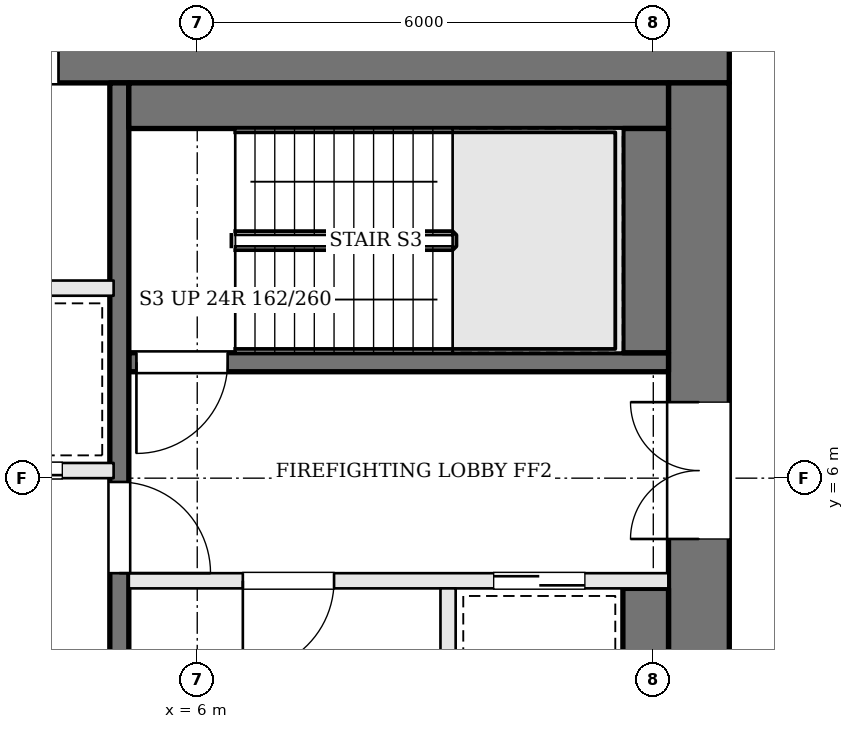
"""IFC4 building model, lengths in metres.
Left out: names, types, materials, properties, quantities, classifications, styles, units other than length and angle.
Written with IfcOpenShell. Run it as: python <this file> out.ifc"""

import sys

from ifc_helpers import new_model, si_unit, direction, frame, frame_2d, origin, place, context, subcontext, project, spatial, rectangle, extrude, element, fill, save


model = new_model("IFC4")
c1 = context("Model", 3, precision=1e-05, world=origin(), true_north=direction((0.0, 1.0)))
c2 = subcontext(c1, "Body", "Model", "MODEL_VIEW")
j1 = project(units=[si_unit("LENGTHUNIT", "METRE"), si_unit("PLANEANGLEUNIT", "RADIAN")], contexts=[c1])
p1 = place(None, origin())
s1 = spatial("IfcSite", under=j1, at=p1, CompositionType="ELEMENT")
p2 = place(p1, origin())
s2 = spatial("IfcBuilding", under=s1, at=p2, CompositionType="ELEMENT")
p3 = place(p2, frame((0.0, 0.0, 268.8)))
s3 = spatial("IfcBuildingStorey", under=s2, at=p3, CompositionType="ELEMENT", Elevation=268.8)
p4 = place(p3, frame((-13.0, 11.6, 0.0), z_axis=(0.0, 0.0, 1.0), x_axis=(1.0, 0.0, 0.0)))
e1 = element("IfcWall", 1, at=p4, inside=s3, PredefinedType="SHEAR", context=c2, shape_type="SweptSolid", body=[
    extrude(rectangle(XDim=26.0, YDim=0.8, at=frame_2d((13.0, 0.0))), origin(), (0.0, 0.0, 1.0), 3.9),
])
p5 = place(p4, frame((8.825, 0.0, 0.0)))
e2 = element("IfcOpeningElement", 2, at=p5, cuts=e1, PredefinedType="OPENING", context=c2, shape_type="SweptSolid", body=[
    extrude(rectangle(XDim=1.0, YDim=2.1, at=frame_2d((0.5, 1.05))), frame((0.0, 0.41, 0.0), z_axis=(0.0, -1.0, 0.0), x_axis=(1.0, 0.0, 0.0)), (0.0, 0.0, 1.0), 0.82),
])
p6 = place(p4, frame((11.825, 0.0, 0.0)))
e3 = element("IfcOpeningElement", 3, at=p6, cuts=e1, PredefinedType="OPENING", context=c2, shape_type="SweptSolid", body=[
    extrude(rectangle(XDim=0.7, YDim=2.1, at=frame_2d((0.35, 1.05))), frame((0.0, 0.41, 0.0), z_axis=(0.0, -1.0, 0.0), x_axis=(1.0, 0.0, 0.0)), (0.0, 0.0, 1.0), 0.82),
])
p7 = place(p4, frame((14.275, 0.0, 0.0)))
e4 = element("IfcOpeningElement", 4, at=p7, cuts=e1, PredefinedType="OPENING", context=c2, shape_type="SweptSolid", body=[
    extrude(rectangle(XDim=0.7, YDim=2.1, at=frame_2d((0.35, 1.05))), frame((0.0, 0.41, 0.0), z_axis=(0.0, -1.0, 0.0), x_axis=(1.0, 0.0, 0.0)), (0.0, 0.0, 1.0), 0.82),
])
p8 = place(p4, frame((16.175, 0.0, 0.0)))
e5 = element("IfcOpeningElement", 5, at=p8, cuts=e1, PredefinedType="OPENING", context=c2, shape_type="SweptSolid", body=[
    extrude(rectangle(XDim=1.0, YDim=2.1, at=frame_2d((0.5, 1.05))), frame((0.0, 0.41, 0.0), z_axis=(0.0, -1.0, 0.0), x_axis=(1.0, 0.0, 0.0)), (0.0, 0.0, 1.0), 0.82),
])
p9 = place(p3, frame((12.6, -2.2, 0.0), z_axis=(0.0, 0.0, 1.0), x_axis=(0.0, 1.0, 0.0)))
e6 = element("IfcWall", 6, at=p9, inside=s3, PredefinedType="SHEAR", context=c2, shape_type="SweptSolid", body=[
    extrude(rectangle(XDim=13.4, YDim=0.8, at=frame_2d((6.7, 0.0))), origin(), (0.0, 0.0, 1.0), 3.9),
])
p10 = place(p9, frame((7.4, 0.0, 0.0)))
e7 = element("IfcOpeningElement", 7, at=p10, cuts=e6, PredefinedType="OPENING", context=c2, shape_type="SweptSolid", body=[
    extrude(rectangle(XDim=1.8, YDim=2.1, at=frame_2d((0.9, 1.05))), frame((0.0, 0.41, 0.0), z_axis=(0.0, -1.0, 0.0), x_axis=(1.0, 0.0, 0.0)), (0.0, 0.0, 1.0), 0.82),
])
p11 = place(p3, frame((12.2, 7.525, 0.0), z_axis=(0.0, 0.0, 1.0), x_axis=(-1.0, 0.0, 0.0)))
e8 = element("IfcWall", 8, at=p11, inside=s3, PredefinedType="SOLIDWALL", context=c2, shape_type="SweptSolid", body=[
    extrude(rectangle(XDim=7.1, YDim=0.25, at=frame_2d((3.55, 0.0))), origin(), (0.0, 0.0, 1.0), 3.7),
])
p12 = place(p11, frame((5.8, 0.0, 0.0)))
e9 = element("IfcOpeningElement", 9, at=p12, cuts=e8, PredefinedType="OPENING", context=c2, shape_type="SweptSolid", body=[
    extrude(rectangle(XDim=1.2, YDim=2.1, at=frame_2d((0.6, 1.05))), frame((0.0, 0.135, 0.0), z_axis=(0.0, -1.0, 0.0), x_axis=(1.0, 0.0, 0.0)), (0.0, 0.0, 1.0), 0.27),
])
p13 = place(p3, frame((12.2, 4.65, 0.0), z_axis=(0.0, 0.0, 1.0), x_axis=(-1.0, 0.0, 0.0)))
e10 = element("IfcWall", 10, at=p13, inside=s3, PredefinedType="SOLIDWALL", context=c2, shape_type="SweptSolid", body=[
    extrude(rectangle(XDim=7.1, YDim=0.2, at=frame_2d((3.55, 0.0))), origin(), (0.0, 0.0, 1.0), 3.7),
])
p14 = place(p13, frame((4.4, 0.0, 0.0)))
e11 = element("IfcOpeningElement", 11, at=p14, cuts=e10, PredefinedType="OPENING", context=c2, shape_type="SweptSolid", body=[
    extrude(rectangle(XDim=1.2, YDim=2.1, at=frame_2d((0.6, 1.05))), frame((0.0, 0.11, 0.0), z_axis=(0.0, -1.0, 0.0), x_axis=(1.0, 0.0, 0.0)), (0.0, 0.0, 1.0), 0.22),
])
p15 = place(p13, frame((1.1, 0.0, 0.0)))
e12 = element("IfcOpeningElement", 12, at=p15, cuts=e10, PredefinedType="OPENING", context=c2, shape_type="SweptSolid", body=[
    extrude(rectangle(XDim=1.2, YDim=2.1, at=frame_2d((0.6, 1.05))), frame((0.0, 0.11, 0.0), z_axis=(0.0, -1.0, 0.0), x_axis=(1.0, 0.0, 0.0)), (0.0, 0.0, 1.0), 0.22),
])
p16 = place(p3, frame((9.3, 4.55, 0.0), z_axis=(0.0, 0.0, 1.0), x_axis=(0.0, -1.0, 0.0)))
e13 = element("IfcWall", 13, at=p16, inside=s3, PredefinedType="SOLIDWALL", context=c2, shape_type="SweptSolid", body=[
    extrude(rectangle(XDim=3.0, YDim=0.2, at=frame_2d((1.5, 0.0))), origin(), (0.0, 0.0, 1.0), 3.7),
])
p17 = place(p3, frame((4.975, 11.2, 0.0), z_axis=(0.0, 0.0, 1.0), x_axis=(0.0, -1.0, 0.0)))
e14 = element("IfcWall", 14, at=p17, inside=s3, PredefinedType="SOLIDWALL", context=c2, shape_type="SweptSolid", body=[
    extrude(rectangle(XDim=13.4, YDim=0.25, at=frame_2d((6.7, 0.0))), origin(), (0.0, 0.0, 1.0), 3.7),
])
p18 = place(p17, frame((5.25, 0.0, 0.0)))
e15 = element("IfcOpeningElement", 15, at=p18, cuts=e14, PredefinedType="OPENING", context=c2, shape_type="SweptSolid", body=[
    extrude(rectangle(XDim=1.2, YDim=2.1, at=frame_2d((0.6, 1.05))), frame((0.0, 0.135, 0.0), z_axis=(0.0, -1.0, 0.0), x_axis=(1.0, 0.0, 0.0)), (0.0, 0.0, 1.0), 0.27),
])
p19 = place(p3, frame((12.2, 10.9, 0.0), z_axis=(0.0, 0.0, 1.0), x_axis=(-1.0, 0.0, 0.0)))
e16 = element("IfcWall", 16, at=p19, inside=s3, PredefinedType="SOLIDWALL", context=c2, shape_type="SweptSolid", body=[
    extrude(rectangle(XDim=7.1, YDim=0.6, at=frame_2d((3.55, 0.0))), origin(), (0.0, 0.0, 1.0), 3.7),
])
p20 = place(p3, frame((11.9, 10.6, 0.0), z_axis=(0.0, 0.0, 1.0), x_axis=(0.0, -1.0, 0.0)))
e17 = element("IfcWall", 17, at=p20, inside=s3, PredefinedType="SOLIDWALL", context=c2, shape_type="SweptSolid", body=[
    extrude(rectangle(XDim=2.95, YDim=0.6, at=frame_2d((1.475, 0.0))), origin(), (0.0, 0.0, 1.0), 3.7),
])
p21 = place(p3, frame((11.9, 4.55, 0.0), z_axis=(0.0, 0.0, 1.0), x_axis=(0.0, -1.0, 0.0)))
e18 = element("IfcWall", 18, at=p21, inside=s3, PredefinedType="SOLIDWALL", context=c2, shape_type="SweptSolid", body=[
    extrude(rectangle(XDim=3.0, YDim=0.6, at=frame_2d((1.5, 0.0))), origin(), (0.0, 0.0, 1.0), 3.7),
])
p22 = place(p3, frame((-4.9, 6.1, 0.0), z_axis=(0.0, 0.0, 1.0), x_axis=(1.0, 0.0, 0.0)))
e19 = element("IfcWall", 19, at=p22, inside=s3, PredefinedType="SOLIDWALL", context=c2, shape_type="SweptSolid", body=[
    extrude(rectangle(XDim=9.8, YDim=0.2, at=frame_2d((4.9, 0.0))), origin(), (0.0, 0.0, 1.0), 3.7),
])
p23 = place(p22, frame((0.675, 0.0, 0.0)))
e20 = element("IfcOpeningElement", 20, at=p23, cuts=e19, PredefinedType="OPENING", context=c2, shape_type="SweptSolid", body=[
    extrude(rectangle(XDim=1.1, YDim=2.1, at=frame_2d((0.55, 1.05))), frame((0.0, 0.11, 0.0), z_axis=(0.0, -1.0, 0.0), x_axis=(1.0, 0.0, 0.0)), (0.0, 0.0, 1.0), 0.22),
])
p24 = place(p22, frame((3.125, 0.0, 0.0)))
e21 = element("IfcOpeningElement", 21, at=p24, cuts=e19, PredefinedType="OPENING", context=c2, shape_type="SweptSolid", body=[
    extrude(rectangle(XDim=1.1, YDim=2.1, at=frame_2d((0.55, 1.05))), frame((0.0, 0.11, 0.0), z_axis=(0.0, -1.0, 0.0), x_axis=(1.0, 0.0, 0.0)), (0.0, 0.0, 1.0), 0.22),
])
p25 = place(p22, frame((5.575, 0.0, 0.0)))
e22 = element("IfcOpeningElement", 22, at=p25, cuts=e19, PredefinedType="OPENING", context=c2, shape_type="SweptSolid", body=[
    extrude(rectangle(XDim=1.1, YDim=2.1, at=frame_2d((0.55, 1.05))), frame((0.0, 0.11, 0.0), z_axis=(0.0, -1.0, 0.0), x_axis=(1.0, 0.0, 0.0)), (0.0, 0.0, 1.0), 0.22),
])
p26 = place(p22, frame((8.025, 0.0, 0.0)))
e23 = element("IfcOpeningElement", 23, at=p26, cuts=e19, PredefinedType="OPENING", context=c2, shape_type="SweptSolid", body=[
    extrude(rectangle(XDim=1.1, YDim=2.1, at=frame_2d((0.55, 1.05))), frame((0.0, 0.11, 0.0), z_axis=(0.0, -1.0, 0.0), x_axis=(1.0, 0.0, 0.0)), (0.0, 0.0, 1.0), 0.22),
])
p27 = place(p3, frame((-4.9, 8.5, 0.0), z_axis=(0.0, 0.0, 1.0), x_axis=(1.0, 0.0, 0.0)))
e24 = element("IfcWall", 24, at=p27, inside=s3, PredefinedType="SOLIDWALL", context=c2, shape_type="SweptSolid", body=[
    extrude(rectangle(XDim=9.8, YDim=0.2, at=frame_2d((4.9, 0.0))), origin(), (0.0, 0.0, 1.0), 3.7),
])
p28 = place(p10, origin())
e25 = element("IfcDoor", 25, at=p28, inside=s3, OperationType="DOUBLE_DOOR_SINGLE_SWING", PredefinedType="DOOR", context=c2, shape_type="SweptSolid", body=[
    extrude(rectangle(XDim=1.8, YDim=2.1, at=frame_2d((0.9, 1.05))), frame((0.0, 0.025, 0.0), z_axis=(0.0, -1.0, 0.0), x_axis=(1.0, 0.0, 0.0)), (0.0, 0.0, 1.0), 0.05),
])
fill(e7, e25)
p29 = place(p18, origin())
e26 = element("IfcDoor", 26, at=p29, inside=s3, OperationType="SINGLE_SWING_RIGHT", PredefinedType="DOOR", context=c2, shape_type="SweptSolid", body=[
    extrude(rectangle(XDim=1.2, YDim=2.1, at=frame_2d((0.6, 1.05))), frame((0.0, 0.025, 0.0), z_axis=(0.0, -1.0, 0.0), x_axis=(1.0, 0.0, 0.0)), (0.0, 0.0, 1.0), 0.05),
])
fill(e15, e26)
p30 = place(p14, origin())
e27 = element("IfcDoor", 27, at=p30, inside=s3, OperationType="SINGLE_SWING_RIGHT", PredefinedType="DOOR", context=c2, shape_type="SweptSolid", body=[
    extrude(rectangle(XDim=1.2, YDim=2.1, at=frame_2d((0.6, 1.05))), frame((0.0, 0.025, 0.0), z_axis=(0.0, -1.0, 0.0), x_axis=(1.0, 0.0, 0.0)), (0.0, 0.0, 1.0), 0.05),
])
fill(e11, e27)
p31 = place(p12, origin())
e28 = element("IfcDoor", 28, at=p31, inside=s3, OperationType="SINGLE_SWING_RIGHT", PredefinedType="DOOR", context=c2, shape_type="SweptSolid", body=[
    extrude(rectangle(XDim=1.2, YDim=2.1, at=frame_2d((0.6, 1.05))), frame((0.0, 0.025, 0.0), z_axis=(0.0, -1.0, 0.0), x_axis=(1.0, 0.0, 0.0)), (0.0, 0.0, 1.0), 0.05),
])
fill(e9, e28)
p32 = place(p15, origin())
e29 = element("IfcDoor", 29, at=p32, inside=s3, OperationType="SLIDING_TO_RIGHT", PredefinedType="DOOR", context=c2, shape_type="SweptSolid", body=[
    extrude(rectangle(XDim=1.2, YDim=2.1, at=frame_2d((0.6, 1.05))), frame((0.0, 0.025, 0.0), z_axis=(0.0, -1.0, 0.0), x_axis=(1.0, 0.0, 0.0)), (0.0, 0.0, 1.0), 0.05),
])
fill(e12, e29)
p33 = place(p26, origin())
e30 = element("IfcDoor", 30, at=p33, inside=s3, OperationType="SLIDING_TO_LEFT", PredefinedType="DOOR", context=c2, shape_type="SweptSolid", body=[
    extrude(rectangle(XDim=1.1, YDim=2.1, at=frame_2d((0.55, 1.05))), frame((0.0, 0.025, 0.0), z_axis=(0.0, -1.0, 0.0), x_axis=(1.0, 0.0, 0.0)), (0.0, 0.0, 1.0), 0.05),
])
fill(e23, e30)
p34 = place(p8, origin())
e31 = element("IfcDoor", 31, at=p34, inside=s3, OperationType="SINGLE_SWING_RIGHT", PredefinedType="DOOR", context=c2, shape_type="SweptSolid", body=[
    extrude(rectangle(XDim=1.0, YDim=2.1, at=frame_2d((0.5, 1.05))), frame((0.0, 0.025, 0.0), z_axis=(0.0, -1.0, 0.0), x_axis=(1.0, 0.0, 0.0)), (0.0, 0.0, 1.0), 0.05),
])
fill(e5, e31)
save(model, sys.argv[1])
